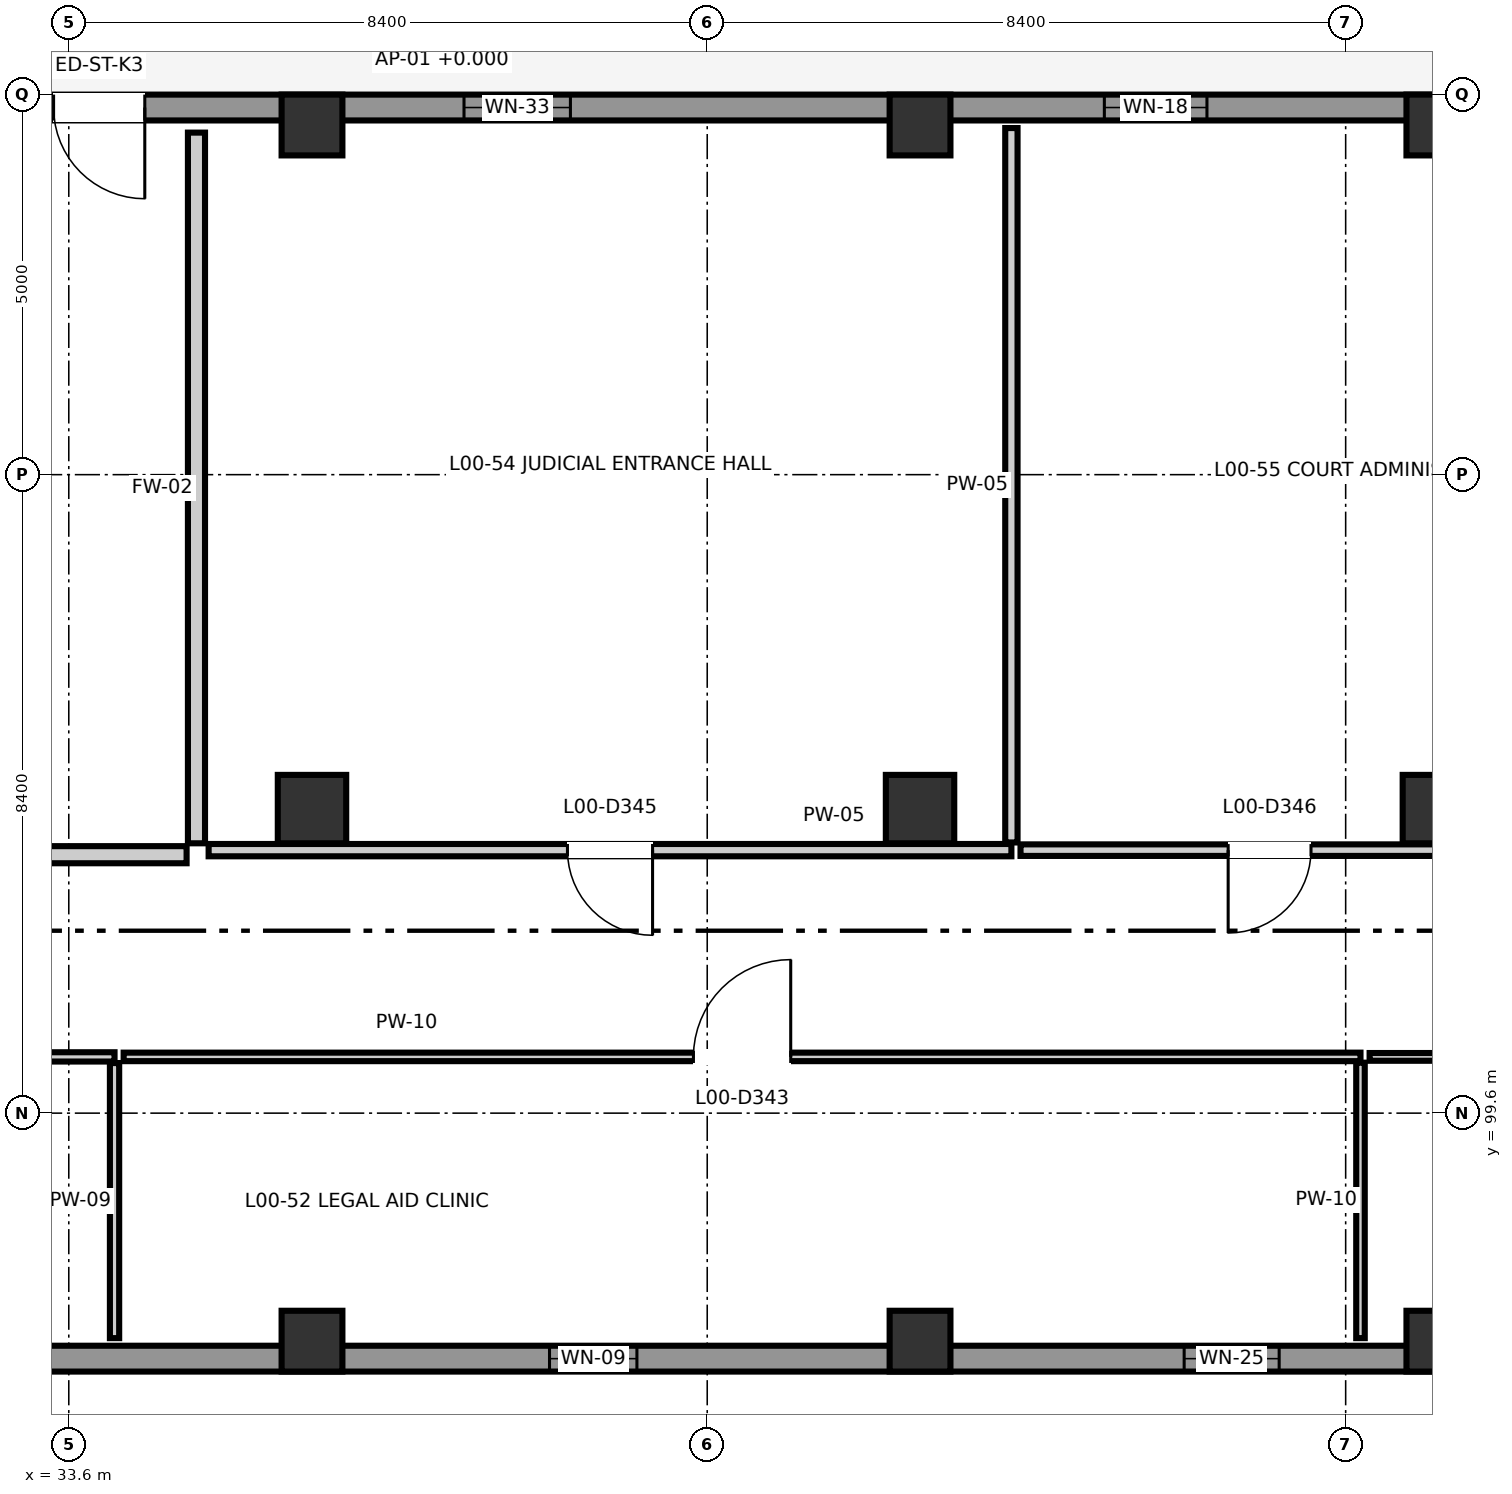
"""IFC4 building model, lengths in metres.
Left out: names, types, materials, properties, quantities, classifications, styles, units other than length and angle.
Written with IfcOpenShell. Run it as: python <this file> out.ifc"""

import sys

from ifc_helpers import new_model, si_unit, direction, frame, frame_2d, origin, origin_2d, place, context, subcontext, project, spatial, rectangle, extrude, element, fill, save


model = new_model("IFC4")
c1 = context("Model", 3, precision=1e-05, world=origin(), true_north=direction((0.0, 1.0)))
c2 = subcontext(c1, "Body", "Model", "MODEL_VIEW")
j1 = project(units=[si_unit("LENGTHUNIT", "METRE"), si_unit("PLANEANGLEUNIT", "RADIAN")], contexts=[c1])
p1 = place(None, origin())
s1 = spatial("IfcSite", under=j1, at=p1, CompositionType="ELEMENT")
p2 = place(p1, origin())
s2 = spatial("IfcBuilding", under=s1, at=p2, CompositionType="ELEMENT")
p3 = place(p2, origin())
s3 = spatial("IfcBuildingStorey", under=s2, at=p3, CompositionType="ELEMENT", Elevation=0.0)
p4 = place(p3, frame((36.8, 96.6, 0.0), z_axis=(0.0, 0.0, 1.0), x_axis=(1.0, 0.0, 0.0)))
e1 = element("IfcColumn", 1, at=p4, inside=s3, PredefinedType="COLUMN", context=c2, shape_type="SweptSolid", body=[
    extrude(rectangle(XDim=0.8, YDim=0.8, at=origin_2d()), origin(), (0.0, 0.0, 1.0), 5.4),
])
p5 = place(p3, frame((36.8, 103.6, 0.0), z_axis=(0.0, 0.0, 1.0), x_axis=(1.0, 0.0, 0.0)))
e2 = element("IfcColumn", 2, at=p5, inside=s3, PredefinedType="COLUMN", context=c2, shape_type="SweptSolid", body=[
    extrude(rectangle(XDim=0.9, YDim=0.9, at=origin_2d()), origin(), (0.0, 0.0, 1.0), 5.4),
])
for number, where, z_axis, x_axis in (
    (3, (36.8, 112.6, 0.0), (0.0, 0.0, 1.0), (1.0, 0.0, 0.0)),
    (4, (44.8, 96.6, 0.0), (0.0, 0.0, 1.0), (1.0, 0.0, 0.0)),
):
    element("IfcColumn", number, at=place(p3, frame(where, z_axis=z_axis, x_axis=x_axis)), inside=s3, PredefinedType="COLUMN", context=c2, shape_type="SweptSolid", body=[
        extrude(rectangle(XDim=0.8, YDim=0.8, at=origin_2d()), origin(), (0.0, 0.0, 1.0), 5.4),
    ])
p6 = place(p3, frame((44.8, 103.6, 0.0), z_axis=(0.0, 0.0, 1.0), x_axis=(1.0, 0.0, 0.0)))
e5 = element("IfcColumn", 5, at=p6, inside=s3, PredefinedType="COLUMN", context=c2, shape_type="SweptSolid", body=[
    extrude(rectangle(XDim=0.9, YDim=0.9, at=origin_2d()), origin(), (0.0, 0.0, 1.0), 5.4),
])
for number, where, z_axis, x_axis in (
    (6, (44.8, 112.6, 0.0), (0.0, 0.0, 1.0), (1.0, 0.0, 0.0)),
    (7, (51.6, 96.6, 0.0), (0.0, 0.0, 1.0), (1.0, 0.0, 0.0)),
):
    element("IfcColumn", number, at=place(p3, frame(where, z_axis=z_axis, x_axis=x_axis)), inside=s3, PredefinedType="COLUMN", context=c2, shape_type="SweptSolid", body=[
        extrude(rectangle(XDim=0.8, YDim=0.8, at=origin_2d()), origin(), (0.0, 0.0, 1.0), 5.4),
    ])
p7 = place(p3, frame((51.6, 103.6, 0.0), z_axis=(0.0, 0.0, 1.0), x_axis=(1.0, 0.0, 0.0)))
e8 = element("IfcColumn", 8, at=p7, inside=s3, PredefinedType="COLUMN", context=c2, shape_type="SweptSolid", body=[
    extrude(rectangle(XDim=0.9, YDim=0.9, at=origin_2d()), origin(), (0.0, 0.0, 1.0), 5.4),
])
p8 = place(p3, frame((51.6, 112.6, 0.0), z_axis=(0.0, 0.0, 1.0), x_axis=(1.0, 0.0, 0.0)))
e9 = element("IfcColumn", 9, at=p8, inside=s3, PredefinedType="COLUMN", context=c2, shape_type="SweptSolid", body=[
    extrude(rectangle(XDim=0.8, YDim=0.8, at=origin_2d()), origin(), (0.0, 0.0, 1.0), 5.4),
])
p9 = place(p3, frame((17.4, 96.37, 0.0), z_axis=(0.0, 0.0, 1.0), x_axis=(1.0, 0.0, 0.0)))
e10 = element("IfcWall", 10, at=p9, inside=s3, PredefinedType="SOLIDWALL", context=c2, shape_type="SweptSolid", body=[
    extrude(rectangle(XDim=49.4, YDim=0.34, at=frame_2d((24.7, 0.0))), origin(), (0.0, 0.0, 1.0), 5.1),
])
p10 = place(p9, frame((5.1, 0.0, 0.72)))
e11 = element("IfcOpeningElement", 11, at=p10, cuts=e10, PredefinedType="OPENING", context=c2, shape_type="SweptSolid", body=[
    extrude(rectangle(XDim=2.4, YDim=2.35, at=frame_2d((1.2, 1.175))), frame((0.0, 0.185, 0.0), z_axis=(0.0, -1.0, 0.0), x_axis=(1.0, 0.0, 0.0)), (0.0, 0.0, 1.0), 0.37),
])
p11 = place(p9, frame((22.525, 0.0, 0.72)))
e12 = element("IfcOpeningElement", 12, at=p11, cuts=e10, PredefinedType="OPENING", context=c2, shape_type="SweptSolid", body=[
    extrude(rectangle(XDim=1.15, YDim=1.75, at=frame_2d((0.575, 0.875))), frame((0.0, 0.185, 0.0), z_axis=(0.0, -1.0, 0.0), x_axis=(1.0, 0.0, 0.0)), (0.0, 0.0, 1.0), 0.37),
])
p12 = place(p9, frame((30.875, 0.0, 0.72)))
e13 = element("IfcOpeningElement", 13, at=p12, cuts=e10, PredefinedType="OPENING", context=c2, shape_type="SweptSolid", body=[
    extrude(rectangle(XDim=1.25, YDim=2.15, at=frame_2d((0.625, 1.075))), frame((0.0, 0.185, 0.0), z_axis=(0.0, -1.0, 0.0), x_axis=(1.0, 0.0, 0.0)), (0.0, 0.0, 1.0), 0.37),
])
p13 = place(p9, frame((43.4, 0.0, 0.72)))
e14 = element("IfcOpeningElement", 14, at=p13, cuts=e10, PredefinedType="OPENING", context=c2, shape_type="SweptSolid", body=[
    extrude(rectangle(XDim=1.4, YDim=2.15, at=frame_2d((0.7, 1.075))), frame((0.0, 0.185, 0.0), z_axis=(0.0, -1.0, 0.0), x_axis=(1.0, 0.0, 0.0)), (0.0, 0.0, 1.0), 0.37),
])
p14 = place(p3, frame((66.8, 112.83, 0.0), z_axis=(0.0, 0.0, 1.0), x_axis=(-1.0, 0.0, 0.0)))
e15 = element("IfcWall", 15, at=p14, inside=s3, PredefinedType="SOLIDWALL", context=c2, shape_type="SweptSolid", body=[
    extrude(rectangle(XDim=64.8, YDim=0.34, at=frame_2d((32.4, 0.0))), origin(), (0.0, 0.0, 1.0), 5.1),
])
p15 = place(p14, frame((32.2, 0.0, 0.0)))
e16 = element("IfcOpeningElement", 16, at=p15, cuts=e15, PredefinedType="OPENING", context=c2, shape_type="SweptSolid", body=[
    extrude(rectangle(XDim=1.2, YDim=2.2, at=frame_2d((0.6, 1.1))), frame((0.0, 0.185, 0.0), z_axis=(0.0, -1.0, 0.0), x_axis=(1.0, 0.0, 0.0)), (0.0, 0.0, 1.0), 0.37),
])
p16 = place(p14, frame((1.55, 0.0, 0.72)))
e17 = element("IfcOpeningElement", 17, at=p16, cuts=e15, PredefinedType="OPENING", context=c2, shape_type="SweptSolid", body=[
    extrude(rectangle(XDim=1.1, YDim=1.5, at=frame_2d((0.55, 0.75))), frame((0.0, 0.185, 0.0), z_axis=(0.0, -1.0, 0.0), x_axis=(1.0, 0.0, 0.0)), (0.0, 0.0, 1.0), 0.37),
])
p17 = place(p14, frame((5.7, 0.0, 0.72)))
e18 = element("IfcOpeningElement", 18, at=p17, cuts=e15, PredefinedType="OPENING", context=c2, shape_type="SweptSolid", body=[
    extrude(rectangle(XDim=1.2, YDim=1.95, at=frame_2d((0.6, 0.975))), frame((0.0, 0.185, 0.0), z_axis=(0.0, -1.0, 0.0), x_axis=(1.0, 0.0, 0.0)), (0.0, 0.0, 1.0), 0.37),
])
p18 = place(p14, frame((18.225, 0.0, 0.72)))
e19 = element("IfcOpeningElement", 19, at=p18, cuts=e15, PredefinedType="OPENING", context=c2, shape_type="SweptSolid", body=[
    extrude(rectangle(XDim=1.35, YDim=1.95, at=frame_2d((0.675, 0.975))), frame((0.0, 0.185, 0.0), z_axis=(0.0, -1.0, 0.0), x_axis=(1.0, 0.0, 0.0)), (0.0, 0.0, 1.0), 0.37),
])
p19 = place(p14, frame((26.6, 0.0, 0.72)))
e20 = element("IfcOpeningElement", 20, at=p19, cuts=e15, PredefinedType="OPENING", context=c2, shape_type="SweptSolid", body=[
    extrude(rectangle(XDim=1.4, YDim=2.35, at=frame_2d((0.7, 1.175))), frame((0.0, 0.185, 0.0), z_axis=(0.0, -1.0, 0.0), x_axis=(1.0, 0.0, 0.0)), (0.0, 0.0, 1.0), 0.37),
])
p20 = place(p14, frame((51.675, 0.0, 0.72)))
e21 = element("IfcOpeningElement", 21, at=p20, cuts=e15, PredefinedType="OPENING", context=c2, shape_type="SweptSolid", body=[
    extrude(rectangle(XDim=1.65, YDim=1.95, at=frame_2d((0.825, 0.975))), frame((0.0, 0.185, 0.0), z_axis=(0.0, -1.0, 0.0), x_axis=(1.0, 0.0, 0.0)), (0.0, 0.0, 1.0), 0.37),
])
p21 = place(p3, frame((20.15, 103.0, 0.0), z_axis=(0.0, 0.0, 1.0), x_axis=(1.0, 0.0, 0.0)))
e22 = element("IfcWall", 22, at=p21, inside=s3, PredefinedType="PARTITIONING", context=c2, shape_type="SweptSolid", body=[
    extrude(rectangle(XDim=15.0, YDim=0.225, at=frame_2d((7.5, 0.0))), origin(), (0.0, 0.0, 1.0), 5.1),
])
p22 = place(p21, frame((5.25, 0.0, 0.0)))
e23 = element("IfcOpeningElement", 23, at=p22, cuts=e22, PredefinedType="OPENING", context=c2, shape_type="SweptSolid", body=[
    extrude(rectangle(XDim=1.3, YDim=2.15, at=frame_2d((0.65, 1.075))), frame((0.0, 0.127, 0.0), z_axis=(0.0, -1.0, 0.0), x_axis=(1.0, 0.0, 0.0)), (0.0, 0.0, 1.0), 0.255),
])
p23 = place(p3, frame((35.28, 103.15, 0.0), z_axis=(0.0, 0.0, 1.0), x_axis=(0.0, 1.0, 0.0)))
e24 = element("IfcWall", 24, at=p23, inside=s3, PredefinedType="PARTITIONING", context=c2, shape_type="SweptSolid", body=[
    extrude(rectangle(XDim=9.35, YDim=0.225, at=frame_2d((4.675, 0.0))), origin(), (0.0, 0.0, 1.0), 5.1),
])
p24 = place(p3, frame((18.755, 100.34, 0.0), z_axis=(0.0, 0.0, 1.0), x_axis=(1.0, 0.0, 0.0)))
e25 = element("IfcWall", 25, at=p24, inside=s3, PredefinedType="PARTITIONING", context=c2, shape_type="SweptSolid", body=[
    extrude(rectangle(XDim=15.447, YDim=0.122, at=frame_2d((7.724, 0.0))), origin(), (0.0, 0.0, 1.0), 4.78),
])
p25 = place(p24, frame((7.243, 0.0, 0.0)))
e26 = element("IfcOpeningElement", 26, at=p25, cuts=e25, PredefinedType="OPENING", context=c2, shape_type="SweptSolid", body=[
    extrude(rectangle(XDim=0.96, YDim=2.08, at=frame_2d((0.48, 1.04))), frame((0.0, 0.076, 0.0), z_axis=(0.0, -1.0, 0.0), x_axis=(1.0, 0.0, 0.0)), (0.0, 0.0, 1.0), 0.152),
])
p26 = place(p3, frame((34.202, 96.64, 0.0), z_axis=(0.0, 0.0, 1.0), x_axis=(0.0, 1.0, 0.0)))
e27 = element("IfcWall", 27, at=p26, inside=s3, PredefinedType="PARTITIONING", context=c2, shape_type="SweptSolid", body=[
    extrude(rectangle(XDim=3.619, YDim=0.122, at=frame_2d((1.81, 0.0))), origin(), (0.0, 0.0, 1.0), 5.1),
])
p27 = place(p3, frame((34.322, 100.34, 0.0), z_axis=(0.0, 0.0, 1.0), x_axis=(1.0, 0.0, 0.0)))
e28 = element("IfcWall", 28, at=p27, inside=s3, PredefinedType="PARTITIONING", context=c2, shape_type="SweptSolid", body=[
    extrude(rectangle(XDim=16.273, YDim=0.112, at=frame_2d((8.136, 0.0))), origin(), (0.0, 0.0, 1.0), 4.43),
])
p28 = place(p27, frame((7.497, 0.0, 0.0)))
e29 = element("IfcOpeningElement", 29, at=p28, cuts=e28, PredefinedType="OPENING", context=c2, shape_type="SweptSolid", body=[
    extrude(rectangle(XDim=1.28, YDim=2.18, at=frame_2d((0.64, 1.09))), frame((0.0, 0.071, 0.0), z_axis=(0.0, -1.0, 0.0), x_axis=(1.0, 0.0, 0.0)), (0.0, 0.0, 1.0), 0.142),
])
p29 = place(p3, frame((50.595, 96.64, 0.0), z_axis=(0.0, 0.0, 1.0), x_axis=(0.0, 1.0, 0.0)))
e30 = element("IfcWall", 30, at=p29, inside=s3, PredefinedType="PARTITIONING", context=c2, shape_type="SweptSolid", body=[
    extrude(rectangle(XDim=3.624, YDim=0.112, at=frame_2d((1.812, 0.0))), origin(), (0.0, 0.0, 1.0), 5.1),
])
p30 = place(p3, frame((50.715, 100.34, 0.0), z_axis=(0.0, 0.0, 1.0), x_axis=(1.0, 0.0, 0.0)))
e31 = element("IfcWall", 31, at=p30, inside=s3, PredefinedType="PARTITIONING", context=c2, shape_type="SweptSolid", body=[
    extrude(rectangle(XDim=15.705, YDim=0.102, at=frame_2d((7.853, 0.0))), origin(), (0.0, 0.0, 1.0), 4.43),
])
p31 = place(p30, frame((7.393, 0.0, 0.0)))
e32 = element("IfcOpeningElement", 32, at=p31, cuts=e31, PredefinedType="OPENING", context=c2, shape_type="SweptSolid", body=[
    extrude(rectangle(XDim=0.92, YDim=2.06, at=frame_2d((0.46, 1.03))), frame((0.0, 0.066, 0.0), z_axis=(0.0, -1.0, 0.0), x_axis=(1.0, 0.0, 0.0)), (0.0, 0.0, 1.0), 0.132),
])
p32 = place(p3, frame((35.44, 103.06, 0.0), z_axis=(0.0, 0.0, 1.0), x_axis=(1.0, 0.0, 0.0)))
e33 = element("IfcWall", 33, at=p32, inside=s3, PredefinedType="PARTITIONING", context=c2, shape_type="SweptSolid", body=[
    extrude(rectangle(XDim=10.562, YDim=0.162, at=frame_2d((5.281, 0.0))), origin(), (0.0, 0.0, 1.0), 5.1),
])
p33 = place(p32, frame((4.721, 0.0, 0.0)))
e34 = element("IfcOpeningElement", 34, at=p33, cuts=e33, PredefinedType="OPENING", context=c2, shape_type="SweptSolid", body=[
    extrude(rectangle(XDim=1.12, YDim=2.14, at=frame_2d((0.56, 1.07))), frame((0.0, 0.096, 0.0), z_axis=(0.0, -1.0, 0.0), x_axis=(1.0, 0.0, 0.0)), (0.0, 0.0, 1.0), 0.192),
])
p34 = place(p3, frame((46.002, 103.161, 0.0), z_axis=(0.0, 0.0, 1.0), x_axis=(0.0, 1.0, 0.0)))
e35 = element("IfcWall", 35, at=p34, inside=s3, PredefinedType="PARTITIONING", context=c2, shape_type="SweptSolid", body=[
    extrude(rectangle(XDim=9.399, YDim=0.162, at=frame_2d((4.7, 0.0))), origin(), (0.0, 0.0, 1.0), 5.1),
])
p35 = place(p3, frame((46.122, 103.06, 0.0), z_axis=(0.0, 0.0, 1.0), x_axis=(1.0, 0.0, 0.0)))
e36 = element("IfcWall", 36, at=p35, inside=s3, PredefinedType="PARTITIONING", context=c2, shape_type="SweptSolid", body=[
    extrude(rectangle(XDim=9.754, YDim=0.152, at=frame_2d((4.877, 0.0))), origin(), (0.0, 0.0, 1.0), 5.1),
])
p36 = place(p35, frame((2.732, 0.0, 0.0)))
e37 = element("IfcOpeningElement", 37, at=p36, cuts=e36, PredefinedType="OPENING", context=c2, shape_type="SweptSolid", body=[
    extrude(rectangle(XDim=1.09, YDim=2.13, at=frame_2d((0.545, 1.065))), frame((0.0, 0.091, 0.0), z_axis=(0.0, -1.0, 0.0), x_axis=(1.0, 0.0, 0.0)), (0.0, 0.0, 1.0), 0.182),
])
p37 = place(p11, origin())
e38 = element("IfcWindow", 38, at=p37, inside=s3, PartitioningType="SINGLE_PANEL", PredefinedType="WINDOW", context=c2, shape_type="SweptSolid", body=[
    extrude(rectangle(XDim=1.15, YDim=1.75, at=frame_2d((0.575, 0.875))), frame((0.0, 0.03, 0.0), z_axis=(0.0, -1.0, 0.0), x_axis=(1.0, 0.0, 0.0)), (0.0, 0.0, 1.0), 0.06),
])
fill(e12, e38)
p38 = place(p12, origin())
e39 = element("IfcWindow", 39, at=p38, inside=s3, PartitioningType="SINGLE_PANEL", PredefinedType="WINDOW", context=c2, shape_type="SweptSolid", body=[
    extrude(rectangle(XDim=1.25, YDim=2.15, at=frame_2d((0.625, 1.075))), frame((0.0, 0.03, 0.0), z_axis=(0.0, -1.0, 0.0), x_axis=(1.0, 0.0, 0.0)), (0.0, 0.0, 1.0), 0.06),
])
fill(e13, e39)
p39 = place(p15, frame((1.2, 0.0, 0.0), z_axis=(0.0, 0.0, 1.0), x_axis=(-1.0, 0.0, 0.0)))
e40 = element("IfcDoor", 40, at=p39, inside=s3, OperationType="SINGLE_SWING_LEFT", PredefinedType="DOOR", context=c2, shape_type="SweptSolid", body=[
    extrude(rectangle(XDim=1.2, YDim=2.2, at=frame_2d((0.6, 1.1))), frame((0.0, 0.025, 0.0), z_axis=(0.0, -1.0, 0.0), x_axis=(1.0, 0.0, 0.0)), (0.0, 0.0, 1.0), 0.05),
])
fill(e16, e40)
p40 = place(p18, origin())
e41 = element("IfcWindow", 41, at=p40, inside=s3, PartitioningType="SINGLE_PANEL", PredefinedType="WINDOW", context=c2, shape_type="SweptSolid", body=[
    extrude(rectangle(XDim=1.35, YDim=1.95, at=frame_2d((0.675, 0.975))), frame((0.0, 0.03, 0.0), z_axis=(0.0, -1.0, 0.0), x_axis=(1.0, 0.0, 0.0)), (0.0, 0.0, 1.0), 0.06),
])
fill(e19, e41)
p41 = place(p19, origin())
e42 = element("IfcWindow", 42, at=p41, inside=s3, PartitioningType="SINGLE_PANEL", PredefinedType="WINDOW", context=c2, shape_type="SweptSolid", body=[
    extrude(rectangle(XDim=1.4, YDim=2.35, at=frame_2d((0.7, 1.175))), frame((0.0, 0.03, 0.0), z_axis=(0.0, -1.0, 0.0), x_axis=(1.0, 0.0, 0.0)), (0.0, 0.0, 1.0), 0.06),
])
fill(e20, e42)
p42 = place(p28, frame((1.28, 0.0, 0.0), z_axis=(0.0, 0.0, 1.0), x_axis=(-1.0, 0.0, 0.0)))
e43 = element("IfcDoor", 43, at=p42, inside=s3, OperationType="SINGLE_SWING_RIGHT", PredefinedType="DOOR", context=c2, shape_type="SweptSolid", body=[
    extrude(rectangle(XDim=1.28, YDim=2.18, at=frame_2d((0.64, 1.09))), frame((0.0, 0.025, 0.0), z_axis=(0.0, -1.0, 0.0), x_axis=(1.0, 0.0, 0.0)), (0.0, 0.0, 1.0), 0.05),
])
fill(e29, e43)
p43 = place(p33, origin())
e44 = element("IfcDoor", 44, at=p43, inside=s3, OperationType="SINGLE_SWING_RIGHT", PredefinedType="DOOR", context=c2, shape_type="SweptSolid", body=[
    extrude(rectangle(XDim=1.12, YDim=2.14, at=frame_2d((0.56, 1.07))), frame((0.0, 0.025, 0.0), z_axis=(0.0, -1.0, 0.0), x_axis=(1.0, 0.0, 0.0)), (0.0, 0.0, 1.0), 0.05),
])
fill(e34, e44)
p44 = place(p36, origin())
e45 = element("IfcDoor", 45, at=p44, inside=s3, OperationType="SINGLE_SWING_LEFT", PredefinedType="DOOR", context=c2, shape_type="SweptSolid", body=[
    extrude(rectangle(XDim=1.09, YDim=2.13, at=frame_2d((0.545, 1.065))), frame((0.0, 0.025, 0.0), z_axis=(0.0, -1.0, 0.0), x_axis=(1.0, 0.0, 0.0)), (0.0, 0.0, 1.0), 0.05),
])
fill(e37, e45)
save(model, sys.argv[1])
